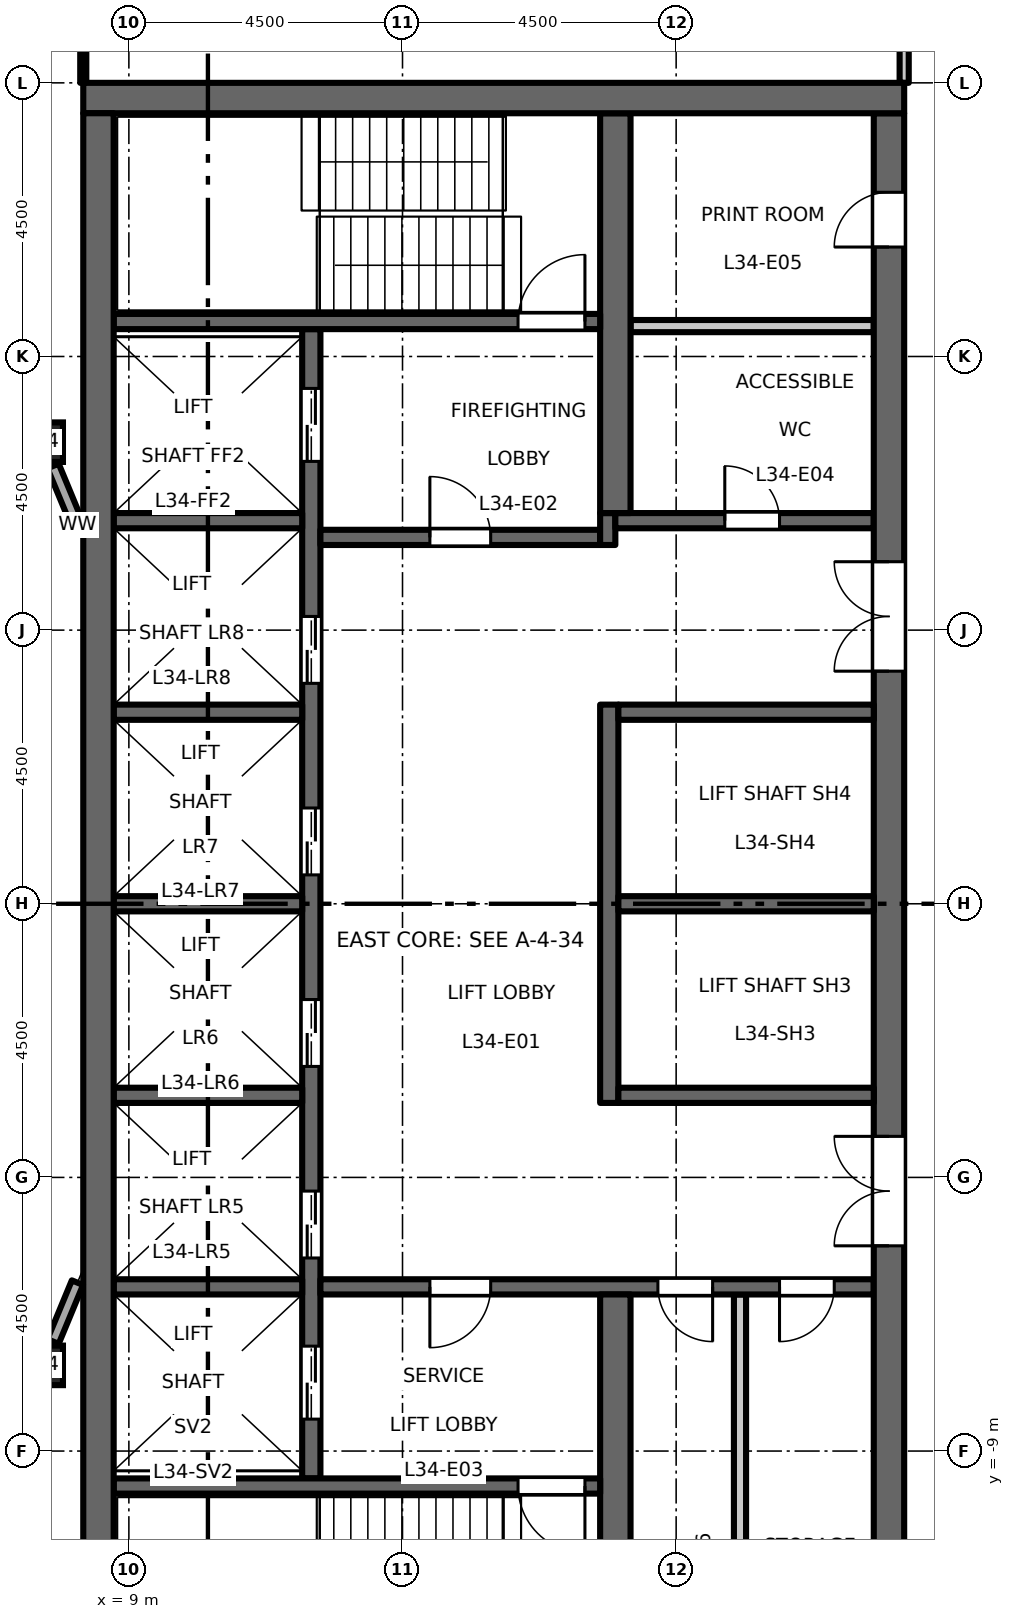
"""IFC4 building model, lengths in metres.
Left out: names, types, materials, properties, quantities, classifications, styles, units other than length and angle.
Written with IfcOpenShell. Run it as: python <this file> out.ifc"""

import sys

from ifc_helpers import new_model, si_unit, direction, frame, frame_2d, origin, origin_2d, place, context, subcontext, project, spatial, rectangle, hollow_rectangle, extrude, element, fill, save


model = new_model("IFC4")
c1 = context("Model", 3, precision=1e-05, world=origin(), true_north=direction((0.0, 1.0)))
c2 = subcontext(c1, "Body", "Model", "MODEL_VIEW")
j1 = project(units=[si_unit("LENGTHUNIT", "METRE"), si_unit("PLANEANGLEUNIT", "RADIAN")], contexts=[c1])
p1 = place(None, origin())
s1 = spatial("IfcSite", under=j1, at=p1, CompositionType="ELEMENT")
p2 = place(p1, origin())
s2 = spatial("IfcBuilding", under=s1, at=p2, CompositionType="ELEMENT")
p3 = place(p2, frame((0.0, 0.0, 158.7)))
s3 = spatial("IfcBuildingStorey", under=s2, at=p3, CompositionType="ELEMENT", Elevation=158.7)
for number, where, z_axis, x_axis in (
    (1, (7.591, -7.591, 0.0), (0.0, 0.0, 1.0), (1.0, 0.0, 0.0)),
    (2, (7.591, 7.591, 0.0), (0.0, 0.0, 1.0), (1.0, 0.0, 0.0)),
):
    element("IfcColumn", number, at=place(p3, frame(where, z_axis=z_axis, x_axis=x_axis)), inside=s3, PredefinedType="COLUMN", context=c2, shape_type="SweptSolid", body=[
        extrude(hollow_rectangle(XDim=0.65, YDim=0.65, WallThickness=0.036, at=origin_2d()), origin(), (0.0, 0.0, 1.0), 4.5),
    ])
p4 = place(p3, frame((12.0, -9.45, 0.0), z_axis=(0.0, 0.0, 1.0), x_axis=(0.0, 1.0, 0.0)))
e3 = element("IfcWall", 3, at=p4, inside=s3, PredefinedType="SHEAR", context=c2, shape_type="SweptSolid", body=[
    extrude(rectangle(XDim=18.9, YDim=0.3, at=frame_2d((9.45, 0.0))), origin(), (0.0, 0.0, 1.0), 4.35),
])
p5 = place(p4, frame((3.625, 0.0, 0.0)))
e4 = element("IfcOpeningElement", 4, at=p5, cuts=e3, PredefinedType="OPENING", context=c2, shape_type="SweptSolid", body=[
    extrude(rectangle(XDim=1.1, YDim=2.1, at=frame_2d((0.55, 1.05))), frame((0.0, 0.16, 0.0), z_axis=(0.0, -1.0, 0.0), x_axis=(1.0, 0.0, 0.0)), (0.0, 0.0, 1.0), 0.32),
])
p6 = place(p4, frame((6.775, 0.0, 0.0)))
e5 = element("IfcOpeningElement", 5, at=p6, cuts=e3, PredefinedType="OPENING", context=c2, shape_type="SweptSolid", body=[
    extrude(rectangle(XDim=1.1, YDim=2.1, at=frame_2d((0.55, 1.05))), frame((0.0, 0.16, 0.0), z_axis=(0.0, -1.0, 0.0), x_axis=(1.0, 0.0, 0.0)), (0.0, 0.0, 1.0), 0.32),
])
p7 = place(p4, frame((9.925, 0.0, 0.0)))
e6 = element("IfcOpeningElement", 6, at=p7, cuts=e3, PredefinedType="OPENING", context=c2, shape_type="SweptSolid", body=[
    extrude(rectangle(XDim=1.1, YDim=2.1, at=frame_2d((0.55, 1.05))), frame((0.0, 0.16, 0.0), z_axis=(0.0, -1.0, 0.0), x_axis=(1.0, 0.0, 0.0)), (0.0, 0.0, 1.0), 0.32),
])
p8 = place(p4, frame((13.075, 0.0, 0.0)))
e7 = element("IfcOpeningElement", 7, at=p8, cuts=e3, PredefinedType="OPENING", context=c2, shape_type="SweptSolid", body=[
    extrude(rectangle(XDim=1.1, YDim=2.1, at=frame_2d((0.55, 1.05))), frame((0.0, 0.16, 0.0), z_axis=(0.0, -1.0, 0.0), x_axis=(1.0, 0.0, 0.0)), (0.0, 0.0, 1.0), 0.32),
])
p9 = place(p4, frame((16.725, 0.0, 0.0)))
e8 = element("IfcOpeningElement", 8, at=p9, cuts=e3, PredefinedType="OPENING", context=c2, shape_type="SweptSolid", body=[
    extrude(rectangle(XDim=1.2, YDim=2.1, at=frame_2d((0.6, 1.05))), frame((0.0, 0.16, 0.0), z_axis=(0.0, -1.0, 0.0), x_axis=(1.0, 0.0, 0.0)), (0.0, 0.0, 1.0), 0.32),
])
p10 = place(p4, frame((0.975, 0.0, 0.0)))
e9 = element("IfcOpeningElement", 9, at=p10, cuts=e3, PredefinedType="OPENING", context=c2, shape_type="SweptSolid", body=[
    extrude(rectangle(XDim=1.2, YDim=2.1, at=frame_2d((0.6, 1.05))), frame((0.0, 0.16, 0.0), z_axis=(0.0, -1.0, 0.0), x_axis=(1.0, 0.0, 0.0)), (0.0, 0.0, 1.0), 0.32),
])
p11 = place(p3, frame((12.15, 6.025, 0.0), z_axis=(0.0, 0.0, 1.0), x_axis=(1.0, 0.0, 0.0)))
e10 = element("IfcWall", 10, at=p11, inside=s3, PredefinedType="SHEAR", context=c2, shape_type="SweptSolid", body=[
    extrude(rectangle(XDim=4.6, YDim=0.25, at=frame_2d((2.3, 0.0))), origin(), (0.0, 0.0, 1.0), 4.35),
])
p12 = place(p11, frame((1.8, 0.0, 0.0)))
e11 = element("IfcOpeningElement", 11, at=p12, cuts=e10, PredefinedType="OPENING", context=c2, shape_type="SweptSolid", body=[
    extrude(rectangle(XDim=1.0, YDim=2.1, at=frame_2d((0.5, 1.05))), frame((0.0, 0.135, 0.0), z_axis=(0.0, -1.0, 0.0), x_axis=(1.0, 0.0, 0.0)), (0.0, 0.0, 1.0), 0.27),
])
p13 = place(p3, frame((16.875, 5.9, 0.0), z_axis=(0.0, 0.0, 1.0), x_axis=(0.0, 1.0, 0.0)))
e12 = element("IfcWall", 12, at=p13, inside=s3, PredefinedType="SHEAR", context=c2, shape_type="SweptSolid", body=[
    extrude(rectangle(XDim=0.525, YDim=0.25, at=frame_2d((0.263, 0.0))), origin(), (0.0, 0.0, 1.0), 4.35),
])
p14 = place(p3, frame((17.0, 6.3, 0.0), z_axis=(0.0, 0.0, 1.0), x_axis=(1.0, 0.0, 0.0)))
e13 = element("IfcWall", 13, at=p14, inside=s3, PredefinedType="SHEAR", context=c2, shape_type="SweptSolid", body=[
    extrude(rectangle(XDim=4.25, YDim=0.25, at=frame_2d((2.125, 0.0))), origin(), (0.0, 0.0, 1.0), 4.35),
])
p15 = place(p14, frame((1.8, 0.0, 0.0)))
e14 = element("IfcOpeningElement", 14, at=p15, cuts=e13, PredefinedType="OPENING", context=c2, shape_type="SweptSolid", body=[
    extrude(rectangle(XDim=0.9, YDim=2.1, at=frame_2d((0.45, 1.05))), frame((0.0, 0.135, 0.0), z_axis=(0.0, -1.0, 0.0), x_axis=(1.0, 0.0, 0.0)), (0.0, 0.0, 1.0), 0.27),
])
p16 = place(p3, frame((12.15, -6.3, 0.0), z_axis=(0.0, 0.0, 1.0), x_axis=(1.0, 0.0, 0.0)))
e15 = element("IfcWall", 15, at=p16, inside=s3, PredefinedType="SHEAR", context=c2, shape_type="SweptSolid", body=[
    extrude(rectangle(XDim=9.1, YDim=0.25, at=frame_2d((4.55, 0.0))), origin(), (0.0, 0.0, 1.0), 4.35),
])
p17 = place(p16, frame((1.8, 0.0, 0.0)))
e16 = element("IfcOpeningElement", 16, at=p17, cuts=e15, PredefinedType="OPENING", context=c2, shape_type="SweptSolid", body=[
    extrude(rectangle(XDim=1.0, YDim=2.1, at=frame_2d((0.5, 1.05))), frame((0.0, 0.135, 0.0), z_axis=(0.0, -1.0, 0.0), x_axis=(1.0, 0.0, 0.0)), (0.0, 0.0, 1.0), 0.27),
])
p18 = place(p16, frame((5.55, 0.0, 0.0)))
e17 = element("IfcOpeningElement", 17, at=p18, cuts=e15, PredefinedType="OPENING", context=c2, shape_type="SweptSolid", body=[
    extrude(rectangle(XDim=0.9, YDim=2.1, at=frame_2d((0.45, 1.05))), frame((0.0, 0.135, 0.0), z_axis=(0.0, -1.0, 0.0), x_axis=(1.0, 0.0, 0.0)), (0.0, 0.0, 1.0), 0.27),
])
p19 = place(p16, frame((7.55, 0.0, 0.0)))
e18 = element("IfcOpeningElement", 18, at=p19, cuts=e15, PredefinedType="OPENING", context=c2, shape_type="SweptSolid", body=[
    extrude(rectangle(XDim=0.9, YDim=2.1, at=frame_2d((0.45, 1.05))), frame((0.0, 0.135, 0.0), z_axis=(0.0, -1.0, 0.0), x_axis=(1.0, 0.0, 0.0)), (0.0, 0.0, 1.0), 0.27),
])
p20 = place(p3, frame((21.5, -13.0, 0.0), z_axis=(0.0, 0.0, 1.0), x_axis=(0.0, 1.0, 0.0)))
e19 = element("IfcWall", 19, at=p20, inside=s3, PredefinedType="SHEAR", context=c2, shape_type="SweptSolid", body=[
    extrude(rectangle(XDim=26.0, YDim=0.5, at=frame_2d((13.0, 0.0))), origin(), (0.0, 0.0, 1.0), 4.35),
])
p21 = place(p20, frame((16.825, 0.0, 0.0)))
e20 = element("IfcOpeningElement", 20, at=p21, cuts=e19, PredefinedType="OPENING", context=c2, shape_type="SweptSolid", body=[
    extrude(rectangle(XDim=1.8, YDim=2.1, at=frame_2d((0.9, 1.05))), frame((0.0, 0.26, 0.0), z_axis=(0.0, -1.0, 0.0), x_axis=(1.0, 0.0, 0.0)), (0.0, 0.0, 1.0), 0.52),
])
p22 = place(p20, frame((7.375, 0.0, 0.0)))
e21 = element("IfcOpeningElement", 21, at=p22, cuts=e19, PredefinedType="OPENING", context=c2, shape_type="SweptSolid", body=[
    extrude(rectangle(XDim=1.8, YDim=2.1, at=frame_2d((0.9, 1.05))), frame((0.0, 0.26, 0.0), z_axis=(0.0, -1.0, 0.0), x_axis=(1.0, 0.0, 0.0)), (0.0, 0.0, 1.0), 0.52),
])
p23 = place(p20, frame((23.8, 0.0, 0.0)))
e22 = element("IfcOpeningElement", 22, at=p23, cuts=e19, PredefinedType="OPENING", context=c2, shape_type="SweptSolid", body=[
    extrude(rectangle(XDim=0.9, YDim=2.1, at=frame_2d((0.45, 1.05))), frame((0.0, 0.26, 0.0), z_axis=(0.0, -1.0, 0.0), x_axis=(1.0, 0.0, 0.0)), (0.0, 0.0, 1.0), 0.52),
])
p24 = place(p3, frame((17.25, 9.5, 0.0), z_axis=(0.0, 0.0, 1.0), x_axis=(1.0, 0.0, 0.0)))
e23 = element("IfcWall", 23, at=p24, inside=s3, PredefinedType="PARTITIONING", context=c2, shape_type="SweptSolid", body=[
    extrude(rectangle(XDim=4.0, YDim=0.2, at=frame_2d((2.0, 0.0))), origin(), (0.0, 0.0, 1.0), 4.35),
])
p25 = place(p3, frame((19.05, -13.0, 0.0), z_axis=(0.0, 0.0, 1.0), x_axis=(0.0, 1.0, 0.0)))
e24 = element("IfcWall", 24, at=p25, inside=s3, PredefinedType="PARTITIONING", context=c2, shape_type="SweptSolid", body=[
    extrude(rectangle(XDim=6.575, YDim=0.2, at=frame_2d((3.288, 0.0))), origin(), (0.0, 0.0, 1.0), 4.35),
])
p26 = place(p3, frame((16.9, -3.275, 0.0), z_axis=(0.0, 0.0, 1.0), x_axis=(0.0, 1.0, 0.0)))
e25 = element("IfcWall", 25, at=p26, inside=s3, PredefinedType="SHEAR", context=c2, shape_type="SweptSolid", body=[
    extrude(rectangle(XDim=6.55, YDim=0.3, at=frame_2d((3.275, 0.0))), origin(), (0.0, 0.0, 1.0), 4.35),
])
for number, where, z_axis, x_axis in (
    (26, (17.05, 0.0, 0.0), (0.0, 0.0, 1.0), (1.0, 0.0, 0.0)),
    (27, (17.05, 3.15, 0.0), (0.0, 0.0, 1.0), (1.0, 0.0, 0.0)),
    (28, (17.05, -3.15, 0.0), (0.0, 0.0, 1.0), (1.0, 0.0, 0.0)),
):
    element("IfcWall", number, at=place(p3, frame(where, z_axis=z_axis, x_axis=x_axis)), inside=s3, PredefinedType="SHEAR", context=c2, shape_type="SweptSolid", body=[
        extrude(rectangle(XDim=4.2, YDim=0.25, at=frame_2d((2.1, 0.0))), origin(), (0.0, 0.0, 1.0), 4.35),
    ])
for number, where, z_axis, x_axis in (
    (29, (17.0, 6.425, 0.0), (0.0, 0.0, 1.0), (0.0, 1.0, 0.0)),
    (30, (17.0, -13.0, 0.0), (0.0, 0.0, 1.0), (0.0, 1.0, 0.0)),
):
    element("IfcWall", number, at=place(p3, frame(where, z_axis=z_axis, x_axis=x_axis)), inside=s3, PredefinedType="SHEAR", context=c2, shape_type="SweptSolid", body=[
        extrude(rectangle(XDim=6.575, YDim=0.5, at=frame_2d((3.288, 0.0))), origin(), (0.0, 0.0, 1.0), 4.35),
    ])
for number, where, z_axis, x_axis in (
    (31, (8.75, 0.0, 0.0), (0.0, 0.0, 1.0), (1.0, 0.0, 0.0)),
    (32, (8.75, 3.15, 0.0), (0.0, 0.0, 1.0), (1.0, 0.0, 0.0)),
    (33, (8.75, 6.3, 0.0), (0.0, 0.0, 1.0), (1.0, 0.0, 0.0)),
    (34, (8.75, -3.15, 0.0), (0.0, 0.0, 1.0), (1.0, 0.0, 0.0)),
    (35, (8.75, -6.3, 0.0), (0.0, 0.0, 1.0), (1.0, 0.0, 0.0)),
):
    element("IfcWall", number, at=place(p3, frame(where, z_axis=z_axis, x_axis=x_axis)), inside=s3, PredefinedType="SHEAR", context=c2, shape_type="SweptSolid", body=[
        extrude(rectangle(XDim=3.1, YDim=0.25, at=frame_2d((1.55, 0.0))), origin(), (0.0, 0.0, 1.0), 4.35),
    ])
p27 = place(p3, frame((8.75, 9.575, 0.0), z_axis=(0.0, 0.0, 1.0), x_axis=(1.0, 0.0, 0.0)))
e36 = element("IfcWall", 36, at=p27, inside=s3, PredefinedType="SHEAR", context=c2, shape_type="SweptSolid", body=[
    extrude(rectangle(XDim=8.0, YDim=0.25, at=frame_2d((4.0, 0.0))), origin(), (0.0, 0.0, 1.0), 4.35),
])
p28 = place(p27, frame((6.65, 0.0, 0.0)))
e37 = element("IfcOpeningElement", 37, at=p28, cuts=e36, PredefinedType="OPENING", context=c2, shape_type="SweptSolid", body=[
    extrude(rectangle(XDim=1.1, YDim=2.1, at=frame_2d((0.55, 1.05))), frame((0.0, 0.135, 0.0), z_axis=(0.0, -1.0, 0.0), x_axis=(1.0, 0.0, 0.0)), (0.0, 0.0, 1.0), 0.27),
])
p29 = place(p3, frame((8.75, -9.575, 0.0), z_axis=(0.0, 0.0, 1.0), x_axis=(1.0, 0.0, 0.0)))
e38 = element("IfcWall", 38, at=p29, inside=s3, PredefinedType="SHEAR", context=c2, shape_type="SweptSolid", body=[
    extrude(rectangle(XDim=8.0, YDim=0.25, at=frame_2d((4.0, 0.0))), origin(), (0.0, 0.0, 1.0), 4.35),
])
p30 = place(p29, frame((6.65, 0.0, 0.0)))
e39 = element("IfcOpeningElement", 39, at=p30, cuts=e38, PredefinedType="OPENING", context=c2, shape_type="SweptSolid", body=[
    extrude(rectangle(XDim=1.1, YDim=2.1, at=frame_2d((0.55, 1.05))), frame((0.0, 0.135, 0.0), z_axis=(0.0, -1.0, 0.0), x_axis=(1.0, 0.0, 0.0)), (0.0, 0.0, 1.0), 0.27),
])
p31 = place(p3, frame((8.25, 13.25, 0.0), z_axis=(0.0, 0.0, 1.0), x_axis=(1.0, 0.0, 0.0)))
e40 = element("IfcWall", 40, at=p31, inside=s3, PredefinedType="SHEAR", context=c2, shape_type="SweptSolid", body=[
    extrude(rectangle(XDim=13.5, YDim=0.5, at=frame_2d((6.75, 0.0))), origin(), (0.0, 0.0, 1.0), 4.35),
])
p32 = place(p3, frame((8.5, -13.0, 0.0), z_axis=(0.0, 0.0, 1.0), x_axis=(0.0, 1.0, 0.0)))
e41 = element("IfcWall", 41, at=p32, inside=s3, PredefinedType="SHEAR", context=c2, shape_type="SweptSolid", body=[
    extrude(rectangle(XDim=26.0, YDim=0.5, at=frame_2d((13.0, 0.0))), origin(), (0.0, 0.0, 1.0), 4.35),
])
for number, where, z_axis, x_axis in (
    (42, (7.753, -7.199, 0.0), (0.0, 0.0, 1.0), (0.383, 0.924, 0.0)),
    (43, (8.154, 6.231, 0.0), (0.0, 0.0, 1.0), (-0.383, 0.924, 0.0)),
):
    element("IfcWall", number, at=place(p3, frame(where, z_axis=z_axis, x_axis=x_axis)), inside=s3, PredefinedType="STANDARD", context=c2, shape_type="SweptSolid", body=[
        extrude(rectangle(XDim=1.048, YDim=0.2, at=frame_2d((0.524, 0.0))), origin(), (0.0, 0.0, 1.0), 3.826),
    ])
p33 = place(p3, frame((8.25, 13.5, 0.0), z_axis=(0.0, 0.0, 1.0), x_axis=(0.0, 1.0, 0.0)))
e44 = element("IfcWall", 44, at=p33, inside=s3, PredefinedType="PARTITIONING", context=c2, shape_type="SweptSolid", body=[
    extrude(rectangle(XDim=4.425, YDim=0.1, at=frame_2d((2.212, 0.0))), origin(), (0.0, 0.0, 1.0), 4.35),
])
p34 = place(p3, frame((21.75, 13.5, 0.0), z_axis=(0.0, 0.0, 1.0), x_axis=(0.0, 1.0, 0.0)))
e45 = element("IfcWall", 45, at=p34, inside=s3, PredefinedType="PARTITIONING", context=c2, shape_type="SweptSolid", body=[
    extrude(rectangle(XDim=4.425, YDim=0.15, at=frame_2d((2.212, 0.0))), origin(), (0.0, 0.0, 1.0), 4.35),
])
p35 = place(p12, origin())
e46 = element("IfcDoor", 46, at=p35, inside=s3, OperationType="SINGLE_SWING_RIGHT", PredefinedType="DOOR", context=c2, shape_type="SweptSolid", body=[
    extrude(rectangle(XDim=1.0, YDim=2.1, at=frame_2d((0.5, 1.05))), frame((0.0, 0.025, 0.0), z_axis=(0.0, -1.0, 0.0), x_axis=(1.0, 0.0, 0.0)), (0.0, 0.0, 1.0), 0.05),
])
fill(e11, e46)
p36 = place(p17, origin())
e47 = element("IfcDoor", 47, at=p36, inside=s3, OperationType="SINGLE_SWING_LEFT", PredefinedType="DOOR", context=c2, shape_type="SweptSolid", body=[
    extrude(rectangle(XDim=1.0, YDim=2.1, at=frame_2d((0.5, 1.05))), frame((0.0, 0.025, 0.0), z_axis=(0.0, -1.0, 0.0), x_axis=(1.0, 0.0, 0.0)), (0.0, 0.0, 1.0), 0.05),
])
fill(e16, e47)
p37 = place(p28, origin())
e48 = element("IfcDoor", 48, at=p37, inside=s3, OperationType="SINGLE_SWING_LEFT", PredefinedType="DOOR", context=c2, shape_type="SweptSolid", body=[
    extrude(rectangle(XDim=1.1, YDim=2.1, at=frame_2d((0.55, 1.05))), frame((0.0, 0.025, 0.0), z_axis=(0.0, -1.0, 0.0), x_axis=(1.0, 0.0, 0.0)), (0.0, 0.0, 1.0), 0.05),
])
fill(e37, e48)
p38 = place(p30, origin())
e49 = element("IfcDoor", 49, at=p38, inside=s3, OperationType="SINGLE_SWING_RIGHT", PredefinedType="DOOR", context=c2, shape_type="SweptSolid", body=[
    extrude(rectangle(XDim=1.1, YDim=2.1, at=frame_2d((0.55, 1.05))), frame((0.0, 0.025, 0.0), z_axis=(0.0, -1.0, 0.0), x_axis=(1.0, 0.0, 0.0)), (0.0, 0.0, 1.0), 0.05),
])
fill(e39, e49)
p39 = place(p21, origin())
e50 = element("IfcDoor", 50, at=p39, inside=s3, OperationType="DOUBLE_DOOR_DOUBLE_SWING", PredefinedType="DOOR", context=c2, shape_type="SweptSolid", body=[
    extrude(rectangle(XDim=1.8, YDim=2.1, at=frame_2d((0.9, 1.05))), frame((0.0, 0.025, 0.0), z_axis=(0.0, -1.0, 0.0), x_axis=(1.0, 0.0, 0.0)), (0.0, 0.0, 1.0), 0.05),
])
fill(e20, e50)
p40 = place(p22, origin())
e51 = element("IfcDoor", 51, at=p40, inside=s3, OperationType="DOUBLE_DOOR_DOUBLE_SWING", PredefinedType="DOOR", context=c2, shape_type="SweptSolid", body=[
    extrude(rectangle(XDim=1.8, YDim=2.1, at=frame_2d((0.9, 1.05))), frame((0.0, 0.025, 0.0), z_axis=(0.0, -1.0, 0.0), x_axis=(1.0, 0.0, 0.0)), (0.0, 0.0, 1.0), 0.05),
])
fill(e21, e51)
p41 = place(p5, origin())
e52 = element("IfcDoor", 52, at=p41, inside=s3, OperationType="DOUBLE_DOOR_SLIDING", PredefinedType="DOOR", context=c2, shape_type="SweptSolid", body=[
    extrude(rectangle(XDim=1.1, YDim=2.1, at=frame_2d((0.55, 1.05))), frame((0.0, 0.025, 0.0), z_axis=(0.0, -1.0, 0.0), x_axis=(1.0, 0.0, 0.0)), (0.0, 0.0, 1.0), 0.05),
])
fill(e4, e52)
p42 = place(p6, origin())
e53 = element("IfcDoor", 53, at=p42, inside=s3, OperationType="DOUBLE_DOOR_SLIDING", PredefinedType="DOOR", context=c2, shape_type="SweptSolid", body=[
    extrude(rectangle(XDim=1.1, YDim=2.1, at=frame_2d((0.55, 1.05))), frame((0.0, 0.025, 0.0), z_axis=(0.0, -1.0, 0.0), x_axis=(1.0, 0.0, 0.0)), (0.0, 0.0, 1.0), 0.05),
])
fill(e5, e53)
p43 = place(p7, origin())
e54 = element("IfcDoor", 54, at=p43, inside=s3, OperationType="DOUBLE_DOOR_SLIDING", PredefinedType="DOOR", context=c2, shape_type="SweptSolid", body=[
    extrude(rectangle(XDim=1.1, YDim=2.1, at=frame_2d((0.55, 1.05))), frame((0.0, 0.025, 0.0), z_axis=(0.0, -1.0, 0.0), x_axis=(1.0, 0.0, 0.0)), (0.0, 0.0, 1.0), 0.05),
])
fill(e6, e54)
p44 = place(p8, origin())
e55 = element("IfcDoor", 55, at=p44, inside=s3, OperationType="DOUBLE_DOOR_SLIDING", PredefinedType="DOOR", context=c2, shape_type="SweptSolid", body=[
    extrude(rectangle(XDim=1.1, YDim=2.1, at=frame_2d((0.55, 1.05))), frame((0.0, 0.025, 0.0), z_axis=(0.0, -1.0, 0.0), x_axis=(1.0, 0.0, 0.0)), (0.0, 0.0, 1.0), 0.05),
])
fill(e7, e55)
p45 = place(p9, origin())
e56 = element("IfcDoor", 56, at=p45, inside=s3, OperationType="DOUBLE_DOOR_SLIDING", PredefinedType="DOOR", context=c2, shape_type="SweptSolid", body=[
    extrude(rectangle(XDim=1.2, YDim=2.1, at=frame_2d((0.6, 1.05))), frame((0.0, 0.025, 0.0), z_axis=(0.0, -1.0, 0.0), x_axis=(1.0, 0.0, 0.0)), (0.0, 0.0, 1.0), 0.05),
])
fill(e8, e56)
p46 = place(p10, origin())
e57 = element("IfcDoor", 57, at=p46, inside=s3, OperationType="DOUBLE_DOOR_SLIDING", PredefinedType="DOOR", context=c2, shape_type="SweptSolid", body=[
    extrude(rectangle(XDim=1.2, YDim=2.1, at=frame_2d((0.6, 1.05))), frame((0.0, 0.025, 0.0), z_axis=(0.0, -1.0, 0.0), x_axis=(1.0, 0.0, 0.0)), (0.0, 0.0, 1.0), 0.05),
])
fill(e9, e57)
p47 = place(p15, origin())
e58 = element("IfcDoor", 58, at=p47, inside=s3, OperationType="SINGLE_SWING_RIGHT", PredefinedType="DOOR", context=c2, shape_type="SweptSolid", body=[
    extrude(rectangle(XDim=0.9, YDim=2.1, at=frame_2d((0.45, 1.05))), frame((0.0, 0.025, 0.0), z_axis=(0.0, -1.0, 0.0), x_axis=(1.0, 0.0, 0.0)), (0.0, 0.0, 1.0), 0.05),
])
fill(e14, e58)
p48 = place(p23, origin())
e59 = element("IfcDoor", 59, at=p48, inside=s3, OperationType="SINGLE_SWING_RIGHT", PredefinedType="DOOR", context=c2, shape_type="SweptSolid", body=[
    extrude(rectangle(XDim=0.9, YDim=2.1, at=frame_2d((0.45, 1.05))), frame((0.0, 0.025, 0.0), z_axis=(0.0, -1.0, 0.0), x_axis=(1.0, 0.0, 0.0)), (0.0, 0.0, 1.0), 0.05),
])
fill(e22, e59)
p49 = place(p18, origin())
e60 = element("IfcDoor", 60, at=p49, inside=s3, OperationType="SINGLE_SWING_RIGHT", PredefinedType="DOOR", context=c2, shape_type="SweptSolid", body=[
    extrude(rectangle(XDim=0.9, YDim=2.1, at=frame_2d((0.45, 1.05))), frame((0.0, 0.025, 0.0), z_axis=(0.0, -1.0, 0.0), x_axis=(1.0, 0.0, 0.0)), (0.0, 0.0, 1.0), 0.05),
])
fill(e17, e60)
p50 = place(p19, origin())
e61 = element("IfcDoor", 61, at=p50, inside=s3, OperationType="SINGLE_SWING_LEFT", PredefinedType="DOOR", context=c2, shape_type="SweptSolid", body=[
    extrude(rectangle(XDim=0.9, YDim=2.1, at=frame_2d((0.45, 1.05))), frame((0.0, 0.025, 0.0), z_axis=(0.0, -1.0, 0.0), x_axis=(1.0, 0.0, 0.0)), (0.0, 0.0, 1.0), 0.05),
])
fill(e18, e61)
save(model, sys.argv[1])
